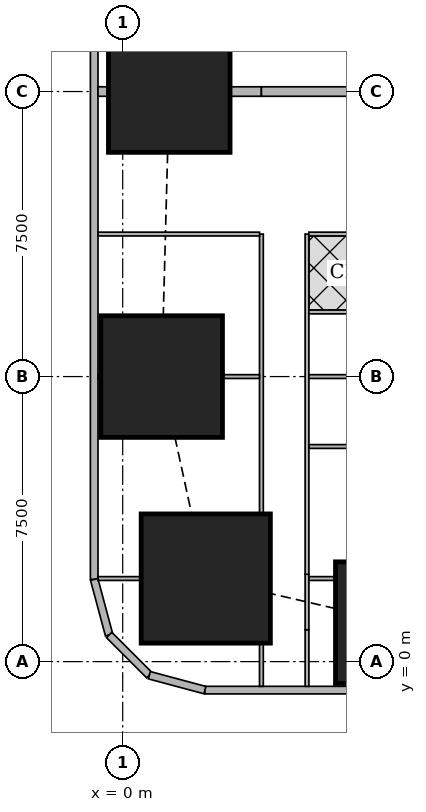
"""IFC4 building model, lengths in metres.
Left out: names, types, materials, properties, quantities, classifications, styles, units other than length and angle.
Written with IfcOpenShell. Run it as: python <this file> out.ifc"""

import sys

from ifc_helpers import new_model, si_unit, direction, frame, frame_2d, origin, origin_2d, place, context, subcontext, project, spatial, rectangle, extrude, element, fill, save


model = new_model("IFC4")
c1 = context("Model", 3, precision=1e-05, world=origin(), true_north=direction((0.0, 1.0)))
c2 = subcontext(c1, "Body", "Model", "MODEL_VIEW")
j1 = project(units=[si_unit("LENGTHUNIT", "METRE"), si_unit("PLANEANGLEUNIT", "RADIAN")], contexts=[c1])
p1 = place(None, origin())
s1 = spatial("IfcSite", under=j1, at=p1, CompositionType="ELEMENT")
p2 = place(p1, origin())
s2 = spatial("IfcBuilding", under=s1, at=p2, CompositionType="ELEMENT")
p3 = place(p2, frame((0.0, 0.0, 20.0)))
s3 = spatial("IfcBuildingStorey", under=s2, at=p3, CompositionType="ELEMENT", Elevation=20.0)
p4 = place(p3, frame((7.2, 1.025, -0.3), z_axis=(0.0, 0.0, 1.0), x_axis=(1.0, 0.0, 0.0)))
e1 = element("IfcColumn", 1, at=p4, inside=s3, PredefinedType="COLUMN", context=c2, shape_type="SweptSolid", body=[
    extrude(rectangle(XDim=3.2, YDim=3.2, at=origin_2d()), origin(), (0.0, 0.0, 1.0), 4.05),
])
p5 = place(p3, frame((2.186, 2.186, 0.0), z_axis=(0.0, 0.0, 1.0), x_axis=(1.0, 0.0, 0.0)))
e2 = element("IfcColumn", 2, at=p5, inside=s3, PredefinedType="COLUMN", context=c2, shape_type="SweptSolid", body=[
    extrude(rectangle(XDim=3.4, YDim=3.4, at=origin_2d()), origin(), (0.0, 0.0, 1.0), 3.75),
])
p6 = place(p3, frame((1.025, 7.5, -0.3), z_axis=(0.0, 0.0, 1.0), x_axis=(1.0, 0.0, 0.0)))
e3 = element("IfcColumn", 3, at=p6, inside=s3, PredefinedType="COLUMN", context=c2, shape_type="SweptSolid", body=[
    extrude(rectangle(XDim=3.2, YDim=3.2, at=origin_2d()), origin(), (0.0, 0.0, 1.0), 4.05),
])
p7 = place(p3, frame((1.225, 15.0, 0.0), z_axis=(0.0, 0.0, 1.0), x_axis=(1.0, 0.0, 0.0)))
e4 = element("IfcColumn", 4, at=p7, inside=s3, PredefinedType="COLUMN", context=c2, shape_type="SweptSolid", body=[
    extrude(rectangle(XDim=3.2, YDim=3.2, at=origin_2d()), origin(), (0.0, 0.0, 1.0), 3.75),
])
p8 = place(p3, frame((2.163, -0.75, 0.0), z_axis=(0.0, 0.0, 1.0), x_axis=(1.0, 0.0, 0.0)))
e5 = element("IfcWall", 5, at=p8, inside=s3, PredefinedType="SOLIDWALL", context=c2, shape_type="SweptSolid", body=[
    extrude(rectangle(XDim=45.628, YDim=0.2, at=frame_2d((22.814, 0.0))), origin(), (0.0, 0.0, 1.0), 3.5),
])
p9 = place(p8, frame((9.537, 0.0, 0.9)))
e6 = element("IfcOpeningElement", 6, at=p9, cuts=e5, PredefinedType="OPENING", context=c2, shape_type="SweptSolid", body=[
    extrude(rectangle(XDim=1.8, YDim=1.5, at=frame_2d((0.9, 0.75))), frame((0.0, 0.11, 0.0), z_axis=(0.0, -1.0, 0.0), x_axis=(1.0, 0.0, 0.0)), (0.0, 0.0, 1.0), 0.22),
])
p10 = place(p8, frame((13.137, 0.0, 0.9)))
e7 = element("IfcOpeningElement", 7, at=p10, cuts=e5, PredefinedType="OPENING", context=c2, shape_type="SweptSolid", body=[
    extrude(rectangle(XDim=1.8, YDim=1.5, at=frame_2d((0.9, 0.75))), frame((0.0, 0.11, 0.0), z_axis=(0.0, -1.0, 0.0), x_axis=(1.0, 0.0, 0.0)), (0.0, 0.0, 1.0), 0.22),
])
p11 = place(p8, frame((16.737, 0.0, 0.9)))
e8 = element("IfcOpeningElement", 8, at=p11, cuts=e5, PredefinedType="OPENING", context=c2, shape_type="SweptSolid", body=[
    extrude(rectangle(XDim=1.8, YDim=1.5, at=frame_2d((0.9, 0.75))), frame((0.0, 0.11, 0.0), z_axis=(0.0, -1.0, 0.0), x_axis=(1.0, 0.0, 0.0)), (0.0, 0.0, 1.0), 0.22),
])
p12 = place(p8, frame((20.337, 0.0, 0.9)))
e9 = element("IfcOpeningElement", 9, at=p12, cuts=e5, PredefinedType="OPENING", context=c2, shape_type="SweptSolid", body=[
    extrude(rectangle(XDim=1.8, YDim=1.5, at=frame_2d((0.9, 0.75))), frame((0.0, 0.11, 0.0), z_axis=(0.0, -1.0, 0.0), x_axis=(1.0, 0.0, 0.0)), (0.0, 0.0, 1.0), 0.22),
])
p13 = place(p8, frame((23.937, 0.0, 0.9)))
e10 = element("IfcOpeningElement", 10, at=p13, cuts=e5, PredefinedType="OPENING", context=c2, shape_type="SweptSolid", body=[
    extrude(rectangle(XDim=1.8, YDim=1.5, at=frame_2d((0.9, 0.75))), frame((0.0, 0.11, 0.0), z_axis=(0.0, -1.0, 0.0), x_axis=(1.0, 0.0, 0.0)), (0.0, 0.0, 1.0), 0.22),
])
p14 = place(p8, frame((27.537, 0.0, 0.9)))
e11 = element("IfcOpeningElement", 11, at=p14, cuts=e5, PredefinedType="OPENING", context=c2, shape_type="SweptSolid", body=[
    extrude(rectangle(XDim=1.8, YDim=1.5, at=frame_2d((0.9, 0.75))), frame((0.0, 0.11, 0.0), z_axis=(0.0, -1.0, 0.0), x_axis=(1.0, 0.0, 0.0)), (0.0, 0.0, 1.0), 0.22),
])
p15 = place(p8, frame((31.137, 0.0, 0.9)))
e12 = element("IfcOpeningElement", 12, at=p15, cuts=e5, PredefinedType="OPENING", context=c2, shape_type="SweptSolid", body=[
    extrude(rectangle(XDim=1.8, YDim=1.5, at=frame_2d((0.9, 0.75))), frame((0.0, 0.11, 0.0), z_axis=(0.0, -1.0, 0.0), x_axis=(1.0, 0.0, 0.0)), (0.0, 0.0, 1.0), 0.22),
])
p16 = place(p8, frame((34.737, 0.0, 0.9)))
e13 = element("IfcOpeningElement", 13, at=p16, cuts=e5, PredefinedType="OPENING", context=c2, shape_type="SweptSolid", body=[
    extrude(rectangle(XDim=1.8, YDim=1.5, at=frame_2d((0.9, 0.75))), frame((0.0, 0.11, 0.0), z_axis=(0.0, -1.0, 0.0), x_axis=(1.0, 0.0, 0.0)), (0.0, 0.0, 1.0), 0.22),
])
p17 = place(p3, frame((-0.75, 42.837, 0.0), z_axis=(0.0, 0.0, 1.0), x_axis=(0.0, -1.0, 0.0)))
e14 = element("IfcWall", 14, at=p17, inside=s3, PredefinedType="SOLIDWALL", context=c2, shape_type="SweptSolid", body=[
    extrude(rectangle(XDim=40.674, YDim=0.2, at=frame_2d((20.337, 0.0))), origin(), (0.0, 0.0, 1.0), 3.5),
])
p18 = place(p17, frame((1.78, 0.0, 0.9)))
e15 = element("IfcOpeningElement", 15, at=p18, cuts=e14, PredefinedType="OPENING", context=c2, shape_type="SweptSolid", body=[
    extrude(rectangle(XDim=1.8, YDim=1.5, at=frame_2d((0.9, 0.75))), frame((0.0, 0.11, 0.0), z_axis=(0.0, -1.0, 0.0), x_axis=(1.0, 0.0, 0.0)), (0.0, 0.0, 1.0), 0.22),
])
p19 = place(p17, frame((6.312, 0.0, 0.9)))
e16 = element("IfcOpeningElement", 16, at=p19, cuts=e14, PredefinedType="OPENING", context=c2, shape_type="SweptSolid", body=[
    extrude(rectangle(XDim=1.8, YDim=1.5, at=frame_2d((0.9, 0.75))), frame((0.0, 0.11, 0.0), z_axis=(0.0, -1.0, 0.0), x_axis=(1.0, 0.0, 0.0)), (0.0, 0.0, 1.0), 0.22),
])
p20 = place(p17, frame((10.062, 0.0, 0.9)))
e17 = element("IfcOpeningElement", 17, at=p20, cuts=e14, PredefinedType="OPENING", context=c2, shape_type="SweptSolid", body=[
    extrude(rectangle(XDim=1.8, YDim=1.5, at=frame_2d((0.9, 0.75))), frame((0.0, 0.11, 0.0), z_axis=(0.0, -1.0, 0.0), x_axis=(1.0, 0.0, 0.0)), (0.0, 0.0, 1.0), 0.22),
])
p21 = place(p17, frame((13.812, 0.0, 0.9)))
e18 = element("IfcOpeningElement", 18, at=p21, cuts=e14, PredefinedType="OPENING", context=c2, shape_type="SweptSolid", body=[
    extrude(rectangle(XDim=1.8, YDim=1.5, at=frame_2d((0.9, 0.75))), frame((0.0, 0.11, 0.0), z_axis=(0.0, -1.0, 0.0), x_axis=(1.0, 0.0, 0.0)), (0.0, 0.0, 1.0), 0.22),
])
p22 = place(p17, frame((17.562, 0.0, 0.9)))
e19 = element("IfcOpeningElement", 19, at=p22, cuts=e14, PredefinedType="OPENING", context=c2, shape_type="SweptSolid", body=[
    extrude(rectangle(XDim=1.8, YDim=1.5, at=frame_2d((0.9, 0.75))), frame((0.0, 0.11, 0.0), z_axis=(0.0, -1.0, 0.0), x_axis=(1.0, 0.0, 0.0)), (0.0, 0.0, 1.0), 0.22),
])
p23 = place(p17, frame((21.312, 0.0, 0.9)))
e20 = element("IfcOpeningElement", 20, at=p23, cuts=e14, PredefinedType="OPENING", context=c2, shape_type="SweptSolid", body=[
    extrude(rectangle(XDim=1.8, YDim=1.5, at=frame_2d((0.9, 0.75))), frame((0.0, 0.11, 0.0), z_axis=(0.0, -1.0, 0.0), x_axis=(1.0, 0.0, 0.0)), (0.0, 0.0, 1.0), 0.22),
])
p24 = place(p17, frame((25.062, 0.0, 0.9)))
e21 = element("IfcOpeningElement", 21, at=p24, cuts=e14, PredefinedType="OPENING", context=c2, shape_type="SweptSolid", body=[
    extrude(rectangle(XDim=1.8, YDim=1.5, at=frame_2d((0.9, 0.75))), frame((0.0, 0.11, 0.0), z_axis=(0.0, -1.0, 0.0), x_axis=(1.0, 0.0, 0.0)), (0.0, 0.0, 1.0), 0.22),
])
p25 = place(p17, frame((28.812, 0.0, 0.9)))
e22 = element("IfcOpeningElement", 22, at=p25, cuts=e14, PredefinedType="OPENING", context=c2, shape_type="SweptSolid", body=[
    extrude(rectangle(XDim=1.8, YDim=1.5, at=frame_2d((0.9, 0.75))), frame((0.0, 0.11, 0.0), z_axis=(0.0, -1.0, 0.0), x_axis=(1.0, 0.0, 0.0)), (0.0, 0.0, 1.0), 0.22),
])
p26 = place(p17, frame((32.562, 0.0, 0.9)))
e23 = element("IfcOpeningElement", 23, at=p26, cuts=e14, PredefinedType="OPENING", context=c2, shape_type="SweptSolid", body=[
    extrude(rectangle(XDim=1.8, YDim=1.5, at=frame_2d((0.9, 0.75))), frame((0.0, 0.11, 0.0), z_axis=(0.0, -1.0, 0.0), x_axis=(1.0, 0.0, 0.0)), (0.0, 0.0, 1.0), 0.22),
])
p27 = place(p17, frame((37.094, 0.0, 0.9)))
e24 = element("IfcOpeningElement", 24, at=p27, cuts=e14, PredefinedType="OPENING", context=c2, shape_type="SweptSolid", body=[
    extrude(rectangle(XDim=1.8, YDim=1.5, at=frame_2d((0.9, 0.75))), frame((0.0, 0.11, 0.0), z_axis=(0.0, -1.0, 0.0), x_axis=(1.0, 0.0, 0.0)), (0.0, 0.0, 1.0), 0.22),
])
p28 = place(p3, frame((-0.75, 2.163, 0.0), z_axis=(0.0, 0.0, 1.0), x_axis=(0.259168954497, -0.965832000415, 0.0)))
e25 = element("IfcWall", 25, at=p28, inside=s3, PredefinedType="SOLIDWALL", context=c2, shape_type="SweptSolid", body=[
    extrude(rectangle(XDim=1.513, YDim=0.2, at=frame_2d((0.756, 0.0))), origin(), (0.0, 0.0, 1.0), 3.5),
])
p29 = place(p3, frame((-0.358, 0.702, 0.0), z_axis=(0.0, 0.0, 1.0), x_axis=(0.707106781187, -0.707106781187, 0.0)))
e26 = element("IfcWall", 26, at=p29, inside=s3, PredefinedType="SOLIDWALL", context=c2, shape_type="SweptSolid", body=[
    extrude(rectangle(XDim=1.499, YDim=0.2, at=frame_2d((0.75, 0.0))), origin(), (0.0, 0.0, 1.0), 3.5),
])
p30 = place(p3, frame((0.702, -0.358, 0.0), z_axis=(0.0, 0.0, 1.0), x_axis=(0.965832000415, -0.259168954497, 0.0)))
e27 = element("IfcWall", 27, at=p30, inside=s3, PredefinedType="SOLIDWALL", context=c2, shape_type="SweptSolid", body=[
    extrude(rectangle(XDim=1.513, YDim=0.2, at=frame_2d((0.756, 0.0))), origin(), (0.0, 0.0, 1.0), 3.5),
])
p31 = place(p3, frame((3.65, -0.65, 0.0), z_axis=(0.0, 0.0, 1.0), x_axis=(0.0, 1.0, 0.0)))
e28 = element("IfcWall", 28, at=p31, inside=s3, PredefinedType="PARTITIONING", context=c2, shape_type="SweptSolid", body=[
    extrude(rectangle(XDim=1.135, YDim=0.1, at=frame_2d((0.567, 0.0))), origin(), (0.0, 0.0, 1.0), 3.5),
])
p32 = place(p3, frame((3.65, 3.887, 0.0), z_axis=(0.0, 0.0, 1.0), x_axis=(0.0, 1.0, 0.0)))
e29 = element("IfcWall", 29, at=p32, inside=s3, PredefinedType="PARTITIONING", context=c2, shape_type="SweptSolid", body=[
    extrude(rectangle(XDim=7.363, YDim=0.1, at=frame_2d((3.682, 0.0))), origin(), (0.0, 0.0, 1.0), 3.5),
])
p33 = place(p32, frame((6.263, 0.0, 0.0)))
e30 = element("IfcOpeningElement", 30, at=p33, cuts=e29, PredefinedType="OPENING", context=c2, shape_type="SweptSolid", body=[
    extrude(rectangle(XDim=0.9, YDim=2.1, at=frame_2d((0.45, 1.05))), frame((0.0, 0.06, 0.0), z_axis=(0.0, -1.0, 0.0), x_axis=(1.0, 0.0, 0.0)), (0.0, 0.0, 1.0), 0.12),
])
p34 = place(p32, frame((1.1, 0.0, 0.0)))
e31 = element("IfcOpeningElement", 31, at=p34, cuts=e29, PredefinedType="OPENING", context=c2, shape_type="SweptSolid", body=[
    extrude(rectangle(XDim=0.9, YDim=2.1, at=frame_2d((0.45, 1.05))), frame((0.0, 0.06, 0.0), z_axis=(0.0, -1.0, 0.0), x_axis=(1.0, 0.0, 0.0)), (0.0, 0.0, 1.0), 0.12),
])
p35 = place(p3, frame((4.85, -0.65, 0.0), z_axis=(0.0, 0.0, 1.0), x_axis=(0.0, 1.0, 0.0)))
e32 = element("IfcWall", 32, at=p35, inside=s3, PredefinedType="PARTITIONING", context=c2, shape_type="SweptSolid", body=[
    extrude(rectangle(XDim=1.489, YDim=0.1, at=frame_2d((0.745, 0.0))), origin(), (0.0, 0.0, 1.0), 3.5),
])
p36 = place(p3, frame((4.85, 0.839, 0.0), z_axis=(0.0, 0.0, 1.0), x_axis=(0.0, 1.0, 0.0)))
e33 = element("IfcWall", 33, at=p36, inside=s3, PredefinedType="PARTITIONING", context=c2, shape_type="SweptSolid", body=[
    extrude(rectangle(XDim=1.46, YDim=0.1, at=frame_2d((0.73, 0.0))), origin(), (0.0, 0.0, 1.0), 2.1),
])
p37 = place(p3, frame((4.85, 2.299, 0.0), z_axis=(0.0, 0.0, 1.0), x_axis=(0.0, 1.0, 0.0)))
e34 = element("IfcWall", 34, at=p37, inside=s3, PredefinedType="PARTITIONING", context=c2, shape_type="SweptSolid", body=[
    extrude(rectangle(XDim=8.951, YDim=0.1, at=frame_2d((4.476, 0.0))), origin(), (0.0, 0.0, 1.0), 3.5),
])
p38 = place(p37, frame((7.476, 0.0, 0.0)))
e35 = element("IfcOpeningElement", 35, at=p38, cuts=e34, PredefinedType="OPENING", context=c2, shape_type="SweptSolid", body=[
    extrude(rectangle(XDim=0.9, YDim=2.1, at=frame_2d((0.45, 1.05))), frame((0.0, 0.06, 0.0), z_axis=(0.0, -1.0, 0.0), x_axis=(1.0, 0.0, 0.0)), (0.0, 0.0, 1.0), 0.12),
])
p39 = place(p37, frame((3.831, 0.0, 0.0)))
e36 = element("IfcOpeningElement", 36, at=p39, cuts=e34, PredefinedType="OPENING", context=c2, shape_type="SweptSolid", body=[
    extrude(rectangle(XDim=0.9, YDim=2.1, at=frame_2d((0.45, 1.05))), frame((0.0, 0.06, 0.0), z_axis=(0.0, -1.0, 0.0), x_axis=(1.0, 0.0, 0.0)), (0.0, 0.0, 1.0), 0.12),
])
p40 = place(p37, frame((5.601, 0.0, 0.0)))
e37 = element("IfcOpeningElement", 37, at=p40, cuts=e34, PredefinedType="OPENING", context=c2, shape_type="SweptSolid", body=[
    extrude(rectangle(XDim=0.9, YDim=2.1, at=frame_2d((0.45, 1.05))), frame((0.0, 0.06, 0.0), z_axis=(0.0, -1.0, 0.0), x_axis=(1.0, 0.0, 0.0)), (0.0, 0.0, 1.0), 0.12),
])
p41 = place(p37, frame((1.6, 0.0, 0.0)))
e38 = element("IfcOpeningElement", 38, at=p41, cuts=e34, PredefinedType="OPENING", context=c2, shape_type="SweptSolid", body=[
    extrude(rectangle(XDim=0.9, YDim=2.1, at=frame_2d((0.45, 1.05))), frame((0.0, 0.06, 0.0), z_axis=(0.0, -1.0, 0.0), x_axis=(1.0, 0.0, 0.0)), (0.0, 0.0, 1.0), 0.12),
])
p42 = place(p3, frame((-0.65, 2.186, 0.0), z_axis=(0.0, 0.0, 1.0), x_axis=(1.0, 0.0, 0.0)))
e39 = element("IfcWall", 39, at=p42, inside=s3, PredefinedType="PARTITIONING", context=c2, shape_type="SweptSolid", body=[
    extrude(rectangle(XDim=1.135, YDim=0.1, at=frame_2d((0.567, 0.0))), origin(), (0.0, 0.0, 1.0), 3.5),
])
p43 = place(p3, frame((-0.65, 7.5, 0.0), z_axis=(0.0, 0.0, 1.0), x_axis=(1.0, 0.0, 0.0)))
e40 = element("IfcWall", 40, at=p43, inside=s3, PredefinedType="PARTITIONING", context=c2, shape_type="SweptSolid", body=[
    extrude(rectangle(XDim=0.074, YDim=0.1, at=frame_2d((0.037, 0.0))), origin(), (0.0, 0.0, 1.0), 3.5),
])
p44 = place(p3, frame((2.626, 7.5, 0.0), z_axis=(0.0, 0.0, 1.0), x_axis=(1.0, 0.0, 0.0)))
e41 = element("IfcWall", 41, at=p44, inside=s3, PredefinedType="PARTITIONING", context=c2, shape_type="SweptSolid", body=[
    extrude(rectangle(XDim=0.974, YDim=0.1, at=frame_2d((0.487, 0.0))), origin(), (0.0, 0.0, 1.0), 3.5),
])
p45 = place(p3, frame((-0.65, 11.25, 0.0), z_axis=(0.0, 0.0, 1.0), x_axis=(1.0, 0.0, 0.0)))
e42 = element("IfcWall", 42, at=p45, inside=s3, PredefinedType="PARTITIONING", context=c2, shape_type="SweptSolid", body=[
    extrude(rectangle(XDim=4.25, YDim=0.1, at=frame_2d((2.125, 0.0))), origin(), (0.0, 0.0, 1.0), 2.05),
])
p46 = place(p3, frame((4.9, 2.186, 0.0), z_axis=(0.0, 0.0, 1.0), x_axis=(1.0, 0.0, 0.0)))
e43 = element("IfcWall", 43, at=p46, inside=s3, PredefinedType="PARTITIONING", context=c2, shape_type="SweptSolid", body=[
    extrude(rectangle(XDim=0.699, YDim=0.1, at=frame_2d((0.35, 0.0))), origin(), (0.0, 0.0, 1.0), 2.1),
])
p47 = place(p3, frame((4.9, 7.5, 0.0), z_axis=(0.0, 0.0, 1.0), x_axis=(1.0, 0.0, 0.0)))
e44 = element("IfcWall", 44, at=p47, inside=s3, PredefinedType="PARTITIONING", context=c2, shape_type="SweptSolid", body=[
    extrude(rectangle(XDim=1.399, YDim=0.1, at=frame_2d((0.7, 0.0))), origin(), (0.0, 0.0, 1.0), 3.5),
])
for number, where, z_axis, x_axis in (
    (45, (4.9, 11.25, 0.0), (0.0, 0.0, 1.0), (1.0, 0.0, 0.0)),
    (46, (4.9, 9.2, 0.0), (0.0, 0.0, 1.0), (1.0, 0.0, 0.0)),
    (47, (4.9, 5.66, 0.0), (0.0, 0.0, 1.0), (1.0, 0.0, 0.0)),
):
    element("IfcWall", number, at=place(p3, frame(where, z_axis=z_axis, x_axis=x_axis)), inside=s3, PredefinedType="PARTITIONING", context=c2, shape_type="SweptSolid", body=[
        extrude(rectangle(XDim=3.525, YDim=0.1, at=frame_2d((1.763, 0.0))), origin(), (0.0, 0.0, 1.0), 3.5),
    ])
p48 = place(p3, frame((-0.65, 15.0, 0.0), z_axis=(0.0, 0.0, 1.0), x_axis=(1.0, 0.0, 0.0)))
e48 = element("IfcWall", 48, at=p48, inside=s3, PredefinedType="SOLIDWALL", context=c2, shape_type="SweptSolid", body=[
    extrude(rectangle(XDim=0.274, YDim=0.25, at=frame_2d((0.137, 0.0))), origin(), (0.0, 0.0, 1.0), 2.05),
])
p49 = place(p3, frame((2.826, 15.0, 0.0), z_axis=(0.0, 0.0, 1.0), x_axis=(1.0, 0.0, 0.0)))
e49 = element("IfcWall", 49, at=p49, inside=s3, PredefinedType="SOLIDWALL", context=c2, shape_type="SweptSolid", body=[
    extrude(rectangle(XDim=0.824, YDim=0.25, at=frame_2d((0.412, 0.0))), origin(), (0.0, 0.0, 1.0), 2.05),
])
p50 = place(p3, frame((3.65, 15.0, 0.0), z_axis=(0.0, 0.0, 1.0), x_axis=(1.0, 0.0, 0.0)))
e50 = element("IfcWall", 50, at=p50, inside=s3, PredefinedType="SOLIDWALL", context=c2, shape_type="SweptSolid", body=[
    extrude(rectangle(XDim=2.649, YDim=0.25, at=frame_2d((1.325, 0.0))), origin(), (0.0, 0.0, 1.0), 3.5),
])
p51 = place(p24, origin())
e51 = element("IfcWindow", 51, at=p51, inside=s3, PartitioningType="SINGLE_PANEL", PredefinedType="WINDOW", context=c2, shape_type="SweptSolid", body=[
    extrude(rectangle(XDim=1.8, YDim=1.5, at=frame_2d((0.9, 0.75))), frame((0.0, 0.03, 0.0), z_axis=(0.0, -1.0, 0.0), x_axis=(1.0, 0.0, 0.0)), (0.0, 0.0, 1.0), 0.06),
])
fill(e21, e51)
p52 = place(p25, origin())
e52 = element("IfcWindow", 52, at=p52, inside=s3, PartitioningType="SINGLE_PANEL", PredefinedType="WINDOW", context=c2, shape_type="SweptSolid", body=[
    extrude(rectangle(XDim=1.8, YDim=1.5, at=frame_2d((0.9, 0.75))), frame((0.0, 0.03, 0.0), z_axis=(0.0, -1.0, 0.0), x_axis=(1.0, 0.0, 0.0)), (0.0, 0.0, 1.0), 0.06),
])
fill(e22, e52)
p53 = place(p26, origin())
e53 = element("IfcWindow", 53, at=p53, inside=s3, PartitioningType="SINGLE_PANEL", PredefinedType="WINDOW", context=c2, shape_type="SweptSolid", body=[
    extrude(rectangle(XDim=1.8, YDim=1.5, at=frame_2d((0.9, 0.75))), frame((0.0, 0.03, 0.0), z_axis=(0.0, -1.0, 0.0), x_axis=(1.0, 0.0, 0.0)), (0.0, 0.0, 1.0), 0.06),
])
fill(e23, e53)
p54 = place(p27, origin())
e54 = element("IfcWindow", 54, at=p54, inside=s3, PartitioningType="SINGLE_PANEL", PredefinedType="WINDOW", context=c2, shape_type="SweptSolid", body=[
    extrude(rectangle(XDim=1.8, YDim=1.5, at=frame_2d((0.9, 0.75))), frame((0.0, 0.03, 0.0), z_axis=(0.0, -1.0, 0.0), x_axis=(1.0, 0.0, 0.0)), (0.0, 0.0, 1.0), 0.06),
])
fill(e24, e54)
p55 = place(p33, origin())
e55 = element("IfcDoor", 55, at=p55, inside=s3, OperationType="SINGLE_SWING_RIGHT", PredefinedType="DOOR", context=c2, shape_type="SweptSolid", body=[
    extrude(rectangle(XDim=0.9, YDim=2.1, at=frame_2d((0.45, 1.05))), frame((0.0, 0.025, 0.0), z_axis=(0.0, -1.0, 0.0), x_axis=(1.0, 0.0, 0.0)), (0.0, 0.0, 1.0), 0.05),
])
fill(e30, e55)
p56 = place(p34, origin())
e56 = element("IfcDoor", 56, at=p56, inside=s3, OperationType="SINGLE_SWING_LEFT", PredefinedType="DOOR", context=c2, shape_type="SweptSolid", body=[
    extrude(rectangle(XDim=0.9, YDim=2.1, at=frame_2d((0.45, 1.05))), frame((0.0, 0.025, 0.0), z_axis=(0.0, -1.0, 0.0), x_axis=(1.0, 0.0, 0.0)), (0.0, 0.0, 1.0), 0.05),
])
fill(e31, e56)
p57 = place(p38, origin())
e57 = element("IfcDoor", 57, at=p57, inside=s3, OperationType="SINGLE_SWING_LEFT", PredefinedType="DOOR", context=c2, shape_type="SweptSolid", body=[
    extrude(rectangle(XDim=0.9, YDim=2.1, at=frame_2d((0.45, 1.05))), frame((0.0, 0.025, 0.0), z_axis=(0.0, -1.0, 0.0), x_axis=(1.0, 0.0, 0.0)), (0.0, 0.0, 1.0), 0.05),
])
fill(e35, e57)
p58 = place(p39, origin())
e58 = element("IfcDoor", 58, at=p58, inside=s3, OperationType="SINGLE_SWING_RIGHT", PredefinedType="DOOR", context=c2, shape_type="SweptSolid", body=[
    extrude(rectangle(XDim=0.9, YDim=2.1, at=frame_2d((0.45, 1.05))), frame((0.0, 0.025, 0.0), z_axis=(0.0, -1.0, 0.0), x_axis=(1.0, 0.0, 0.0)), (0.0, 0.0, 1.0), 0.05),
])
fill(e36, e58)
p59 = place(p40, origin())
e59 = element("IfcDoor", 59, at=p59, inside=s3, OperationType="SINGLE_SWING_RIGHT", PredefinedType="DOOR", context=c2, shape_type="SweptSolid", body=[
    extrude(rectangle(XDim=0.9, YDim=2.1, at=frame_2d((0.45, 1.05))), frame((0.0, 0.025, 0.0), z_axis=(0.0, -1.0, 0.0), x_axis=(1.0, 0.0, 0.0)), (0.0, 0.0, 1.0), 0.05),
])
fill(e37, e59)
p60 = place(p41, origin())
e60 = element("IfcDoor", 60, at=p60, inside=s3, OperationType="SINGLE_SWING_LEFT", PredefinedType="DOOR", context=c2, shape_type="SweptSolid", body=[
    extrude(rectangle(XDim=0.9, YDim=2.1, at=frame_2d((0.45, 1.05))), frame((0.0, 0.025, 0.0), z_axis=(0.0, -1.0, 0.0), x_axis=(1.0, 0.0, 0.0)), (0.0, 0.0, 1.0), 0.05),
])
fill(e38, e60)
save(model, sys.argv[1])
